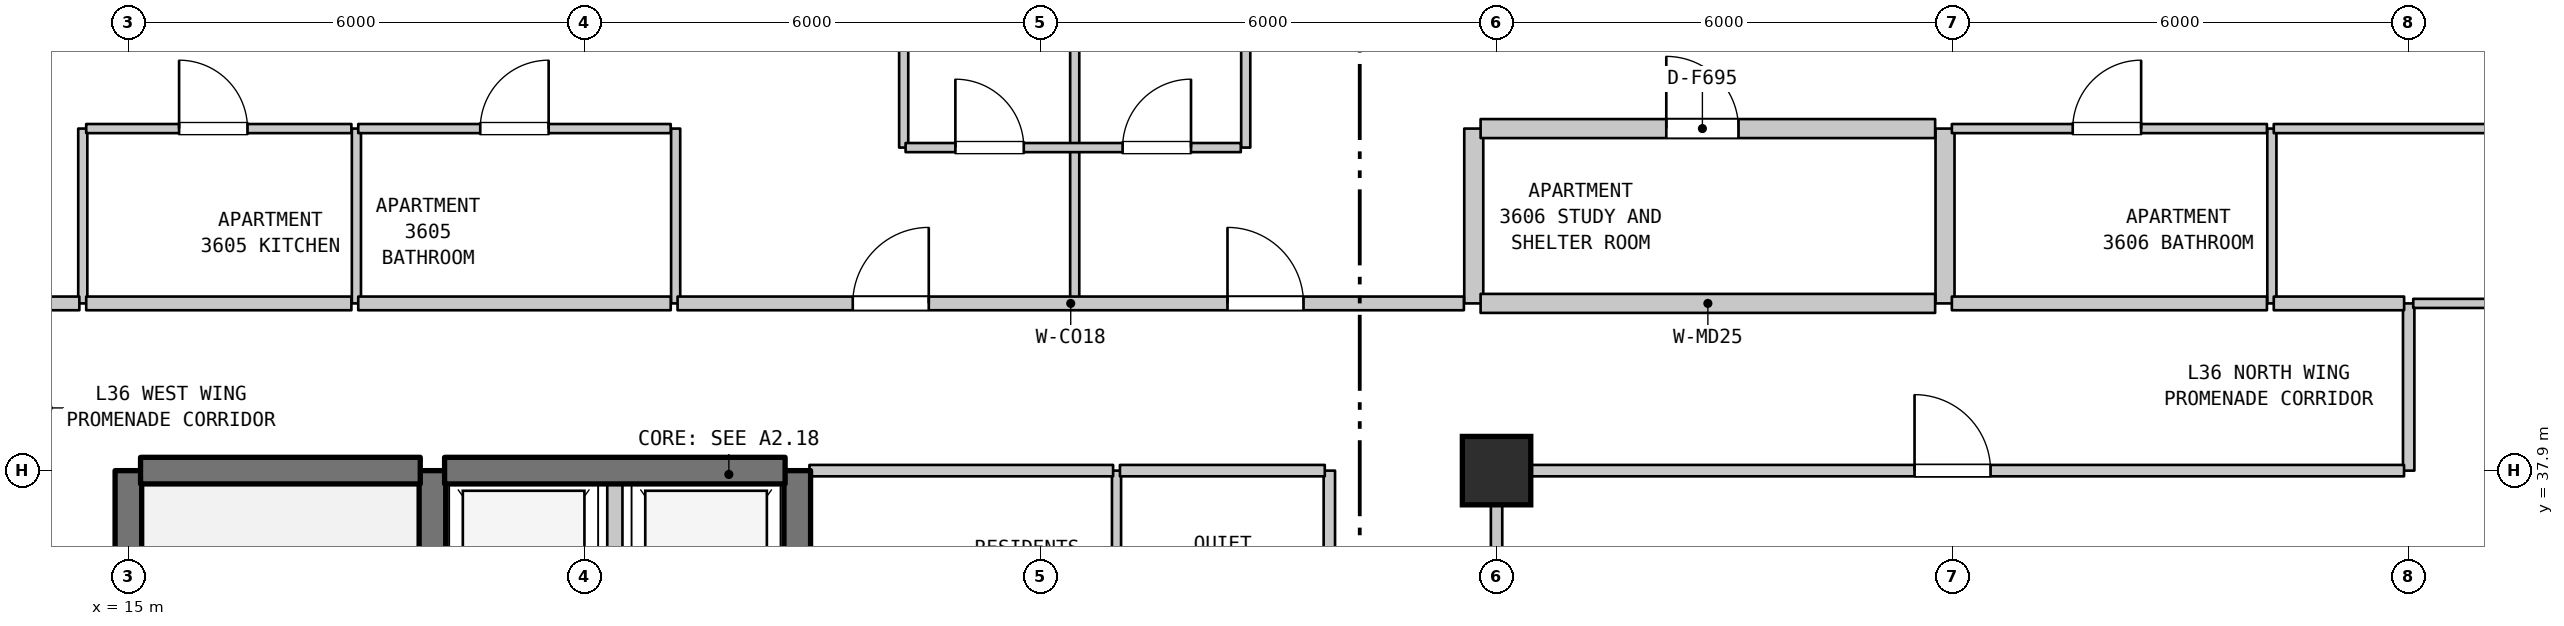
"""IFC4 building model, lengths in metres.
Left out: names, types, materials, properties, quantities, classifications, styles, units other than length and angle.
Written with IfcOpenShell. Run it as: python <this file> out.ifc"""

import sys

from ifc_helpers import new_model, si_unit, direction, frame, frame_2d, origin, origin_2d, place, context, subcontext, project, spatial, rectangle, extrude, element, fill, save


model = new_model("IFC4")
c1 = context("Model", 3, precision=1e-05, world=origin(), true_north=direction((0.0, 1.0)))
c2 = subcontext(c1, "Body", "Model", "MODEL_VIEW")
j1 = project(units=[si_unit("LENGTHUNIT", "METRE"), si_unit("PLANEANGLEUNIT", "RADIAN")], contexts=[c1])
p1 = place(None, origin())
s1 = spatial("IfcSite", under=j1, at=p1, CompositionType="ELEMENT")
p2 = place(p1, origin())
s2 = spatial("IfcBuilding", under=s1, at=p2, CompositionType="ELEMENT")
p3 = place(p2, frame((0.0, 0.0, 148.3)))
s3 = spatial("IfcBuildingStorey", under=s2, at=p3, CompositionType="ELEMENT", Elevation=148.3)
p4 = place(p3, frame((33.0, 37.9, 0.0), z_axis=(0.0, 0.0, 1.0), x_axis=(1.0, 0.0, 0.0)))
e1 = element("IfcColumn", 1, at=p4, inside=s3, PredefinedType="COLUMN", context=c2, shape_type="SweptSolid", body=[
    extrude(rectangle(XDim=0.9, YDim=0.9, at=origin_2d()), origin(), (0.0, 0.0, 1.0), 3.7),
])
p5 = place(p3, frame((14.4, 40.1, 0.0), z_axis=(0.0, 0.0, 1.0), x_axis=(0.0, 1.0, 0.0)))
e2 = element("IfcWall", 2, at=p5, inside=s3, PredefinedType="PARTITIONING", context=c2, shape_type="SweptSolid", body=[
    extrude(rectangle(XDim=2.3, YDim=0.12, at=frame_2d((1.15, 0.0))), origin(), (0.0, 0.0, 1.0), 3.385),
])
p6 = place(p3, frame((15.0, 31.1, 0.0), z_axis=(0.0, 0.0, 1.0), x_axis=(0.0, 1.0, 0.0)))
e3 = element("IfcWall", 3, at=p6, inside=s3, PredefinedType="SHEAR", context=c2, shape_type="SweptSolid", body=[
    extrude(rectangle(XDim=6.8, YDim=0.35, at=frame_2d((3.4, 0.0))), origin(), (0.0, 0.0, 1.0), 3.385),
])
p7 = place(p3, frame((18.0, 40.1, 0.0), z_axis=(0.0, 0.0, 1.0), x_axis=(0.0, 1.0, 0.0)))
e4 = element("IfcWall", 4, at=p7, inside=s3, PredefinedType="PARTITIONING", context=c2, shape_type="SweptSolid", body=[
    extrude(rectangle(XDim=2.3, YDim=0.12, at=frame_2d((1.15, 0.0))), origin(), (0.0, 0.0, 1.0), 3.385),
])
p8 = place(p3, frame((19.0, 35.0, 0.0), z_axis=(0.0, 0.0, 1.0), x_axis=(0.0, 1.0, 0.0)))
e5 = element("IfcWall", 5, at=p8, inside=s3, PredefinedType="SHEAR", context=c2, shape_type="SweptSolid", body=[
    extrude(rectangle(XDim=2.9, YDim=0.35, at=frame_2d((1.45, 0.0))), origin(), (0.0, 0.0, 1.0), 3.385),
])
p9 = place(p3, frame((21.4, 35.0, 0.0), z_axis=(0.0, 0.0, 1.0), x_axis=(0.0, 1.0, 0.0)))
e6 = element("IfcWall", 6, at=p9, inside=s3, PredefinedType="STANDARD", context=c2, shape_type="SweptSolid", body=[
    extrude(rectangle(XDim=2.9, YDim=0.2, at=frame_2d((1.45, 0.0))), origin(), (0.0, 0.0, 1.0), 3.385),
])
p10 = place(p3, frame((22.2, 40.1, 0.0), z_axis=(0.0, 0.0, 1.0), x_axis=(0.0, 1.0, 0.0)))
e7 = element("IfcWall", 7, at=p10, inside=s3, PredefinedType="PARTITIONING", context=c2, shape_type="SweptSolid", body=[
    extrude(rectangle(XDim=2.3, YDim=0.12, at=frame_2d((1.15, 0.0))), origin(), (0.0, 0.0, 1.0), 3.385),
])
p11 = place(p3, frame((23.8, 35.0, 0.0), z_axis=(0.0, 0.0, 1.0), x_axis=(0.0, 1.0, 0.0)))
e8 = element("IfcWall", 8, at=p11, inside=s3, PredefinedType="SHEAR", context=c2, shape_type="SweptSolid", body=[
    extrude(rectangle(XDim=2.9, YDim=0.35, at=frame_2d((1.45, 0.0))), origin(), (0.0, 0.0, 1.0), 3.385),
])
p12 = place(p3, frame((25.2, 42.15, 0.0), z_axis=(0.0, 0.0, 1.0), x_axis=(0.0, 1.0, 0.0)))
e9 = element("IfcWall", 9, at=p12, inside=s3, PredefinedType="PARTITIONING", context=c2, shape_type="SweptSolid", body=[
    extrude(rectangle(XDim=11.74, YDim=0.12, at=frame_2d((5.87, 0.0))), origin(), (0.0, 0.0, 1.0), 3.385),
])
p13 = place(p3, frame((27.45, 40.1, 0.0), z_axis=(0.0, 0.0, 1.0), x_axis=(0.0, 1.0, 0.0)))
e10 = element("IfcWall", 10, at=p13, inside=s3, PredefinedType="PARTITIONING", context=c2, shape_type="SweptSolid", body=[
    extrude(rectangle(XDim=2.05, YDim=0.12, at=frame_2d((1.025, 0.0))), origin(), (0.0, 0.0, 1.0), 3.385),
])
p14 = place(p3, frame((27.45, 42.15, 0.0), z_axis=(0.0, 0.0, 1.0), x_axis=(0.0, 1.0, 0.0)))
e11 = element("IfcWall", 11, at=p14, inside=s3, PredefinedType="PARTITIONING", context=c2, shape_type="SweptSolid", body=[
    extrude(rectangle(XDim=11.74, YDim=0.12, at=frame_2d((5.87, 0.0))), origin(), (0.0, 0.0, 1.0), 3.385),
])
p15 = place(p3, frame((28.0, 35.0, 0.0), z_axis=(0.0, 0.0, 1.0), x_axis=(0.0, 1.0, 0.0)))
e12 = element("IfcWall", 12, at=p15, inside=s3, PredefinedType="PARTITIONING", context=c2, shape_type="SweptSolid", body=[
    extrude(rectangle(XDim=2.9, YDim=0.12, at=frame_2d((1.45, 0.0))), origin(), (0.0, 0.0, 1.0), 3.385),
])
p16 = place(p3, frame((29.7, 42.15, 0.0), z_axis=(0.0, 0.0, 1.0), x_axis=(0.0, 1.0, 0.0)))
e13 = element("IfcWall", 13, at=p16, inside=s3, PredefinedType="PARTITIONING", context=c2, shape_type="SweptSolid", body=[
    extrude(rectangle(XDim=3.15, YDim=0.12, at=frame_2d((1.575, 0.0))), origin(), (0.0, 0.0, 1.0), 3.385),
])
p17 = place(p3, frame((30.8, 35.0, 0.0), z_axis=(0.0, 0.0, 1.0), x_axis=(0.0, 1.0, 0.0)))
e14 = element("IfcWall", 14, at=p17, inside=s3, PredefinedType="STANDARD", context=c2, shape_type="SweptSolid", body=[
    extrude(rectangle(XDim=2.9, YDim=0.15, at=frame_2d((1.45, 0.0))), origin(), (0.0, 0.0, 1.0), 3.385),
])
p18 = place(p3, frame((32.7, 40.1, 0.0), z_axis=(0.0, 0.0, 1.0), x_axis=(0.0, 1.0, 0.0)))
e15 = element("IfcWall", 15, at=p18, inside=s3, PredefinedType="STANDARD", context=c2, shape_type="SweptSolid", body=[
    extrude(rectangle(XDim=2.3, YDim=0.25, at=frame_2d((1.15, 0.0))), origin(), (0.0, 0.0, 1.0), 3.385),
])
p19 = place(p3, frame((33.0, 32.54, 0.0), z_axis=(0.0, 0.0, 1.0), x_axis=(0.0, 1.0, 0.0)))
e16 = element("IfcWall", 16, at=p19, inside=s3, PredefinedType="STANDARD", context=c2, shape_type="SweptSolid", body=[
    extrude(rectangle(XDim=5.36, YDim=0.15, at=frame_2d((2.68, 0.0))), origin(), (0.0, 0.0, 1.0), 2.885),
])
p20 = place(p19, frame((2.109, 0.0, 0.0)))
e17 = element("IfcOpeningElement", 17, at=p20, cuts=e16, PredefinedType="OPENING", context=c2, shape_type="SweptSolid", body=[
    extrude(rectangle(XDim=1.0, YDim=2.15, at=frame_2d((0.5, 1.075))), frame((0.0, 0.085, 0.0), z_axis=(0.0, -1.0, 0.0), x_axis=(1.0, 0.0, 0.0)), (0.0, 0.0, 1.0), 0.17),
])
p21 = place(p3, frame((38.9, 40.1, 0.0), z_axis=(0.0, 0.0, 1.0), x_axis=(0.0, 1.0, 0.0)))
e18 = element("IfcWall", 18, at=p21, inside=s3, PredefinedType="STANDARD", context=c2, shape_type="SweptSolid", body=[
    extrude(rectangle(XDim=2.3, YDim=0.25, at=frame_2d((1.15, 0.0))), origin(), (0.0, 0.0, 1.0), 3.385),
])
p22 = place(p3, frame((43.2, 40.1, 0.0), z_axis=(0.0, 0.0, 1.0), x_axis=(0.0, 1.0, 0.0)))
e19 = element("IfcWall", 19, at=p22, inside=s3, PredefinedType="PARTITIONING", context=c2, shape_type="SweptSolid", body=[
    extrude(rectangle(XDim=2.3, YDim=0.12, at=frame_2d((1.15, 0.0))), origin(), (0.0, 0.0, 1.0), 3.385),
])
p23 = place(p3, frame((45.0, 37.9, 0.0), z_axis=(0.0, 0.0, 1.0), x_axis=(0.0, 1.0, 0.0)))
e20 = element("IfcWall", 20, at=p23, inside=s3, PredefinedType="STANDARD", context=c2, shape_type="SweptSolid", body=[
    extrude(rectangle(XDim=2.2, YDim=0.15, at=frame_2d((1.1, 0.0))), origin(), (0.0, 0.0, 1.0), 3.385),
])
p24 = place(p3, frame((15.16, 37.9, 0.0), z_axis=(0.0, 0.0, 1.0), x_axis=(1.0, 0.0, 0.0)))
e21 = element("IfcWall", 21, at=p24, inside=s3, PredefinedType="SHEAR", context=c2, shape_type="SweptSolid", body=[
    extrude(rectangle(XDim=3.68, YDim=0.35, at=frame_2d((1.84, 0.0))), origin(), (0.0, 0.0, 1.0), 3.385),
])
p25 = place(p3, frame((19.16, 37.9, 0.0), z_axis=(0.0, 0.0, 1.0), x_axis=(1.0, 0.0, 0.0)))
e22 = element("IfcWall", 22, at=p25, inside=s3, PredefinedType="SHEAR", context=c2, shape_type="SweptSolid", body=[
    extrude(rectangle(XDim=4.48, YDim=0.35, at=frame_2d((2.24, 0.0))), origin(), (0.0, 0.0, 1.0), 3.385),
])
p26 = place(p3, frame((23.96, 37.9, 0.0), z_axis=(0.0, 0.0, 1.0), x_axis=(1.0, 0.0, 0.0)))
e23 = element("IfcWall", 23, at=p26, inside=s3, PredefinedType="STANDARD", context=c2, shape_type="SweptSolid", body=[
    extrude(rectangle(XDim=3.995, YDim=0.15, at=frame_2d((1.998, 0.0))), origin(), (0.0, 0.0, 1.0), 2.885),
])
p27 = place(p3, frame((28.045, 37.9, 0.0), z_axis=(0.0, 0.0, 1.0), x_axis=(1.0, 0.0, 0.0)))
e24 = element("IfcWall", 24, at=p27, inside=s3, PredefinedType="STANDARD", context=c2, shape_type="SweptSolid", body=[
    extrude(rectangle(XDim=2.695, YDim=0.15, at=frame_2d((1.348, 0.0))), origin(), (0.0, 0.0, 1.0), 2.885),
])
p28 = place(p3, frame((33.06, 37.9, 0.0), z_axis=(0.0, 0.0, 1.0), x_axis=(1.0, 0.0, 0.0)))
e25 = element("IfcWall", 25, at=p28, inside=s3, PredefinedType="STANDARD", context=c2, shape_type="SweptSolid", body=[
    extrude(rectangle(XDim=11.879, YDim=0.15, at=frame_2d((5.939, 0.0))), origin(), (0.0, 0.0, 1.0), 3.385),
])
p29 = place(p28, frame((5.439, 0.0, 0.0)))
e26 = element("IfcOpeningElement", 26, at=p29, cuts=e25, PredefinedType="OPENING", context=c2, shape_type="SweptSolid", body=[
    extrude(rectangle(XDim=1.0, YDim=2.15, at=frame_2d((0.5, 1.075))), frame((0.0, 0.085, 0.0), z_axis=(0.0, -1.0, 0.0), x_axis=(1.0, 0.0, 0.0)), (0.0, 0.0, 1.0), 0.17),
])
p30 = place(p3, frame((12.875, 40.1, 0.0), z_axis=(0.0, 0.0, 1.0), x_axis=(1.0, 0.0, 0.0)))
e27 = element("IfcWall", 27, at=p30, inside=s3, PredefinedType="STANDARD", context=c2, shape_type="SweptSolid", body=[
    extrude(rectangle(XDim=1.48, YDim=0.18, at=frame_2d((0.74, 0.0))), origin(), (0.0, 0.0, 1.0), 3.385),
])
p31 = place(p3, frame((14.445, 40.1, 0.0), z_axis=(0.0, 0.0, 1.0), x_axis=(1.0, 0.0, 0.0)))
e28 = element("IfcWall", 28, at=p31, inside=s3, PredefinedType="STANDARD", context=c2, shape_type="SweptSolid", body=[
    extrude(rectangle(XDim=3.489, YDim=0.18, at=frame_2d((1.745, 0.0))), origin(), (0.0, 0.0, 1.0), 3.385),
])
p32 = place(p3, frame((18.024, 40.1, 0.0), z_axis=(0.0, 0.0, 1.0), x_axis=(1.0, 0.0, 0.0)))
e29 = element("IfcWall", 29, at=p32, inside=s3, PredefinedType="STANDARD", context=c2, shape_type="SweptSolid", body=[
    extrude(rectangle(XDim=4.111, YDim=0.18, at=frame_2d((2.056, 0.0))), origin(), (0.0, 0.0, 1.0), 3.385),
])
p33 = place(p3, frame((22.225, 40.1, 0.0), z_axis=(0.0, 0.0, 1.0), x_axis=(1.0, 0.0, 0.0)))
e30 = element("IfcWall", 30, at=p33, inside=s3, PredefinedType="STANDARD", context=c2, shape_type="SweptSolid", body=[
    extrude(rectangle(XDim=10.345, YDim=0.18, at=frame_2d((5.172, 0.0))), origin(), (0.0, 0.0, 1.0), 3.385),
])
p34 = place(p33, frame((2.305, 0.0, 0.0)))
e31 = element("IfcOpeningElement", 31, at=p34, cuts=e30, PredefinedType="OPENING", context=c2, shape_type="SweptSolid", body=[
    extrude(rectangle(XDim=1.0, YDim=2.15, at=frame_2d((0.5, 1.075))), frame((0.0, 0.1, 0.0), z_axis=(0.0, -1.0, 0.0), x_axis=(1.0, 0.0, 0.0)), (0.0, 0.0, 1.0), 0.2),
])
p35 = place(p33, frame((7.235, 0.0, 0.0)))
e32 = element("IfcOpeningElement", 32, at=p35, cuts=e30, PredefinedType="OPENING", context=c2, shape_type="SweptSolid", body=[
    extrude(rectangle(XDim=1.0, YDim=2.15, at=frame_2d((0.5, 1.075))), frame((0.0, 0.1, 0.0), z_axis=(0.0, -1.0, 0.0), x_axis=(1.0, 0.0, 0.0)), (0.0, 0.0, 1.0), 0.2),
])
p36 = place(p3, frame((32.79, 40.1, 0.0), z_axis=(0.0, 0.0, 1.0), x_axis=(1.0, 0.0, 0.0)))
e33 = element("IfcWall", 33, at=p36, inside=s3, PredefinedType="STANDARD", context=c2, shape_type="SweptSolid", body=[
    extrude(rectangle(XDim=5.98, YDim=0.25, at=frame_2d((2.99, 0.0))), origin(), (0.0, 0.0, 1.0), 3.385),
])
p37 = place(p3, frame((38.99, 40.1, 0.0), z_axis=(0.0, 0.0, 1.0), x_axis=(1.0, 0.0, 0.0)))
e34 = element("IfcWall", 34, at=p37, inside=s3, PredefinedType="STANDARD", context=c2, shape_type="SweptSolid", body=[
    extrude(rectangle(XDim=4.145, YDim=0.18, at=frame_2d((2.073, 0.0))), origin(), (0.0, 0.0, 1.0), 3.385),
])
p38 = place(p3, frame((43.225, 40.1, 0.0), z_axis=(0.0, 0.0, 1.0), x_axis=(1.0, 0.0, 0.0)))
e35 = element("IfcWall", 35, at=p38, inside=s3, PredefinedType="STANDARD", context=c2, shape_type="SweptSolid", body=[
    extrude(rectangle(XDim=1.715, YDim=0.18, at=frame_2d((0.857, 0.0))), origin(), (0.0, 0.0, 1.0), 3.385),
])
p39 = place(p3, frame((45.06, 40.1, 0.0), z_axis=(0.0, 0.0, 1.0), x_axis=(1.0, 0.0, 0.0)))
e36 = element("IfcWall", 36, at=p39, inside=s3, PredefinedType="PARTITIONING", context=c2, shape_type="SweptSolid", body=[
    extrude(rectangle(XDim=12.932, YDim=0.12, at=frame_2d((6.466, 0.0))), origin(), (0.0, 0.0, 1.0), 3.385),
])
p40 = place(p3, frame((25.225, 42.15, 0.0), z_axis=(0.0, 0.0, 1.0), x_axis=(1.0, 0.0, 0.0)))
e37 = element("IfcWall", 37, at=p40, inside=s3, PredefinedType="PARTITIONING", context=c2, shape_type="SweptSolid", body=[
    extrude(rectangle(XDim=4.41, YDim=0.12, at=frame_2d((2.205, 0.0))), origin(), (0.0, 0.0, 1.0), 3.385),
])
p41 = place(p40, frame((0.655, 0.0, 0.0)))
e38 = element("IfcOpeningElement", 38, at=p41, cuts=e37, PredefinedType="OPENING", context=c2, shape_type="SweptSolid", body=[
    extrude(rectangle(XDim=0.9, YDim=2.15, at=frame_2d((0.45, 1.075))), frame((0.0, 0.07, 0.0), z_axis=(0.0, -1.0, 0.0), x_axis=(1.0, 0.0, 0.0)), (0.0, 0.0, 1.0), 0.14),
])
p42 = place(p40, frame((2.855, 0.0, 0.0)))
e39 = element("IfcOpeningElement", 39, at=p42, cuts=e37, PredefinedType="OPENING", context=c2, shape_type="SweptSolid", body=[
    extrude(rectangle(XDim=0.9, YDim=2.15, at=frame_2d((0.45, 1.075))), frame((0.0, 0.07, 0.0), z_axis=(0.0, -1.0, 0.0), x_axis=(1.0, 0.0, 0.0)), (0.0, 0.0, 1.0), 0.14),
])
p43 = place(p3, frame((14.445, 42.4, 0.0), z_axis=(0.0, 0.0, 1.0), x_axis=(1.0, 0.0, 0.0)))
e40 = element("IfcWall", 40, at=p43, inside=s3, PredefinedType="PARTITIONING", context=c2, shape_type="SweptSolid", body=[
    extrude(rectangle(XDim=3.489, YDim=0.12, at=frame_2d((1.745, 0.0))), origin(), (0.0, 0.0, 1.0), 3.385),
])
p44 = place(p43, frame((1.222, 0.0, 0.0)))
e41 = element("IfcOpeningElement", 41, at=p44, cuts=e40, PredefinedType="OPENING", context=c2, shape_type="SweptSolid", body=[
    extrude(rectangle(XDim=0.9, YDim=2.15, at=frame_2d((0.45, 1.075))), frame((0.0, 0.07, 0.0), z_axis=(0.0, -1.0, 0.0), x_axis=(1.0, 0.0, 0.0)), (0.0, 0.0, 1.0), 0.14),
])
p45 = place(p3, frame((18.024, 42.4, 0.0), z_axis=(0.0, 0.0, 1.0), x_axis=(1.0, 0.0, 0.0)))
e42 = element("IfcWall", 42, at=p45, inside=s3, PredefinedType="PARTITIONING", context=c2, shape_type="SweptSolid", body=[
    extrude(rectangle(XDim=4.111, YDim=0.12, at=frame_2d((2.056, 0.0))), origin(), (0.0, 0.0, 1.0), 3.385),
])
p46 = place(p45, frame((1.605, 0.0, 0.0)))
e43 = element("IfcOpeningElement", 43, at=p46, cuts=e42, PredefinedType="OPENING", context=c2, shape_type="SweptSolid", body=[
    extrude(rectangle(XDim=0.9, YDim=2.1, at=frame_2d((0.45, 1.05))), frame((0.0, 0.07, 0.0), z_axis=(0.0, -1.0, 0.0), x_axis=(1.0, 0.0, 0.0)), (0.0, 0.0, 1.0), 0.14),
])
p47 = place(p3, frame((32.79, 42.4, 0.0), z_axis=(0.0, 0.0, 1.0), x_axis=(1.0, 0.0, 0.0)))
e44 = element("IfcWall", 44, at=p47, inside=s3, PredefinedType="STANDARD", context=c2, shape_type="SweptSolid", body=[
    extrude(rectangle(XDim=5.98, YDim=0.25, at=frame_2d((2.99, 0.0))), origin(), (0.0, 0.0, 1.0), 3.385),
])
p48 = place(p47, frame((2.443, 0.0, 0.0)))
e45 = element("IfcOpeningElement", 45, at=p48, cuts=e44, PredefinedType="OPENING", context=c2, shape_type="SweptSolid", body=[
    extrude(rectangle(XDim=0.95, YDim=2.15, at=frame_2d((0.475, 1.075))), frame((0.0, 0.135, 0.0), z_axis=(0.0, -1.0, 0.0), x_axis=(1.0, 0.0, 0.0)), (0.0, 0.0, 1.0), 0.27),
])
p49 = place(p3, frame((38.99, 42.4, 0.0), z_axis=(0.0, 0.0, 1.0), x_axis=(1.0, 0.0, 0.0)))
e46 = element("IfcWall", 46, at=p49, inside=s3, PredefinedType="PARTITIONING", context=c2, shape_type="SweptSolid", body=[
    extrude(rectangle(XDim=4.145, YDim=0.12, at=frame_2d((2.073, 0.0))), origin(), (0.0, 0.0, 1.0), 3.385),
])
p50 = place(p49, frame((1.59, 0.0, 0.0)))
e47 = element("IfcOpeningElement", 47, at=p50, cuts=e46, PredefinedType="OPENING", context=c2, shape_type="SweptSolid", body=[
    extrude(rectangle(XDim=0.9, YDim=2.1, at=frame_2d((0.45, 1.05))), frame((0.0, 0.07, 0.0), z_axis=(0.0, -1.0, 0.0), x_axis=(1.0, 0.0, 0.0)), (0.0, 0.0, 1.0), 0.14),
])
p51 = place(p3, frame((43.225, 42.4, 0.0), z_axis=(0.0, 0.0, 1.0), x_axis=(1.0, 0.0, 0.0)))
e48 = element("IfcWall", 48, at=p51, inside=s3, PredefinedType="PARTITIONING", context=c2, shape_type="SweptSolid", body=[
    extrude(rectangle(XDim=11.48, YDim=0.12, at=frame_2d((5.74, 0.0))), origin(), (0.0, 0.0, 1.0), 3.385),
])
p52 = place(p51, frame((5.29, 0.0, 0.0)))
e49 = element("IfcOpeningElement", 49, at=p52, cuts=e48, PredefinedType="OPENING", context=c2, shape_type="SweptSolid", body=[
    extrude(rectangle(XDim=0.9, YDim=2.15, at=frame_2d((0.45, 1.075))), frame((0.0, 0.07, 0.0), z_axis=(0.0, -1.0, 0.0), x_axis=(1.0, 0.0, 0.0)), (0.0, 0.0, 1.0), 0.14),
])
p53 = place(p29, origin())
e50 = element("IfcDoor", 50, at=p53, inside=s3, OperationType="SINGLE_SWING_LEFT", PredefinedType="DOOR", context=c2, shape_type="SweptSolid", body=[
    extrude(rectangle(XDim=1.0, YDim=2.15, at=frame_2d((0.5, 1.075))), frame((0.0, 0.025, 0.0), z_axis=(0.0, -1.0, 0.0), x_axis=(1.0, 0.0, 0.0)), (0.0, 0.0, 1.0), 0.05),
])
fill(e26, e50)
p54 = place(p34, origin())
e51 = element("IfcDoor", 51, at=p54, inside=s3, OperationType="SINGLE_SWING_RIGHT", PredefinedType="DOOR", context=c2, shape_type="SweptSolid", body=[
    extrude(rectangle(XDim=1.0, YDim=2.15, at=frame_2d((0.5, 1.075))), frame((0.0, 0.025, 0.0), z_axis=(0.0, -1.0, 0.0), x_axis=(1.0, 0.0, 0.0)), (0.0, 0.0, 1.0), 0.05),
])
fill(e31, e51)
p55 = place(p35, origin())
e52 = element("IfcDoor", 52, at=p55, inside=s3, OperationType="SINGLE_SWING_LEFT", PredefinedType="DOOR", context=c2, shape_type="SweptSolid", body=[
    extrude(rectangle(XDim=1.0, YDim=2.15, at=frame_2d((0.5, 1.075))), frame((0.0, 0.025, 0.0), z_axis=(0.0, -1.0, 0.0), x_axis=(1.0, 0.0, 0.0)), (0.0, 0.0, 1.0), 0.05),
])
fill(e32, e52)
p56 = place(p41, origin())
e53 = element("IfcDoor", 53, at=p56, inside=s3, OperationType="SINGLE_SWING_LEFT", PredefinedType="DOOR", context=c2, shape_type="SweptSolid", body=[
    extrude(rectangle(XDim=0.9, YDim=2.15, at=frame_2d((0.45, 1.075))), frame((0.0, 0.025, 0.0), z_axis=(0.0, -1.0, 0.0), x_axis=(1.0, 0.0, 0.0)), (0.0, 0.0, 1.0), 0.05),
])
fill(e38, e53)
p57 = place(p42, origin())
e54 = element("IfcDoor", 54, at=p57, inside=s3, OperationType="SINGLE_SWING_RIGHT", PredefinedType="DOOR", context=c2, shape_type="SweptSolid", body=[
    extrude(rectangle(XDim=0.9, YDim=2.15, at=frame_2d((0.45, 1.075))), frame((0.0, 0.025, 0.0), z_axis=(0.0, -1.0, 0.0), x_axis=(1.0, 0.0, 0.0)), (0.0, 0.0, 1.0), 0.05),
])
fill(e39, e54)
p58 = place(p44, origin())
e55 = element("IfcDoor", 55, at=p58, inside=s3, OperationType="SINGLE_SWING_LEFT", PredefinedType="DOOR", context=c2, shape_type="SweptSolid", body=[
    extrude(rectangle(XDim=0.9, YDim=2.15, at=frame_2d((0.45, 1.075))), frame((0.0, 0.025, 0.0), z_axis=(0.0, -1.0, 0.0), x_axis=(1.0, 0.0, 0.0)), (0.0, 0.0, 1.0), 0.05),
])
fill(e41, e55)
p59 = place(p46, origin())
e56 = element("IfcDoor", 56, at=p59, inside=s3, OperationType="SINGLE_SWING_RIGHT", PredefinedType="DOOR", context=c2, shape_type="SweptSolid", body=[
    extrude(rectangle(XDim=0.9, YDim=2.1, at=frame_2d((0.45, 1.05))), frame((0.0, 0.025, 0.0), z_axis=(0.0, -1.0, 0.0), x_axis=(1.0, 0.0, 0.0)), (0.0, 0.0, 1.0), 0.05),
])
fill(e43, e56)
p60 = place(p48, origin())
e57 = element("IfcDoor", 57, at=p60, inside=s3, OperationType="SINGLE_SWING_LEFT", PredefinedType="DOOR", context=c2, shape_type="SweptSolid", body=[
    extrude(rectangle(XDim=0.95, YDim=2.15, at=frame_2d((0.475, 1.075))), frame((0.0, 0.025, 0.0), z_axis=(0.0, -1.0, 0.0), x_axis=(1.0, 0.0, 0.0)), (0.0, 0.0, 1.0), 0.05),
])
fill(e45, e57)
p61 = place(p50, origin())
e58 = element("IfcDoor", 58, at=p61, inside=s3, OperationType="SINGLE_SWING_RIGHT", PredefinedType="DOOR", context=c2, shape_type="SweptSolid", body=[
    extrude(rectangle(XDim=0.9, YDim=2.1, at=frame_2d((0.45, 1.05))), frame((0.0, 0.025, 0.0), z_axis=(0.0, -1.0, 0.0), x_axis=(1.0, 0.0, 0.0)), (0.0, 0.0, 1.0), 0.05),
])
fill(e47, e58)
save(model, sys.argv[1])
